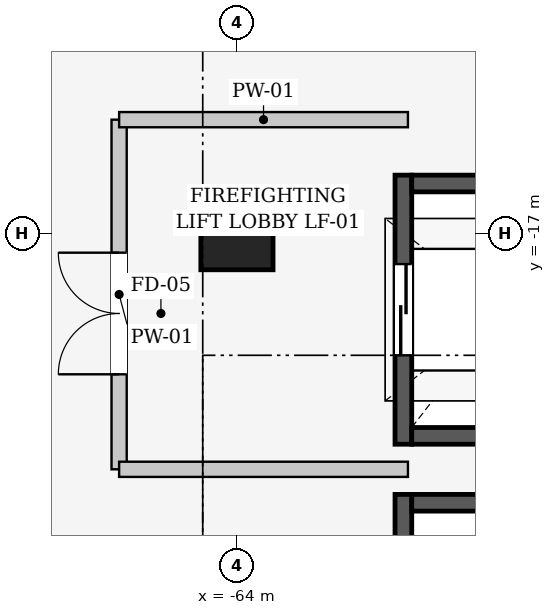
"""IFC4 building model, lengths in metres.
Left out: names, types, materials, properties, quantities, classifications, styles, units other than length and angle.
Written with IfcOpenShell. Run it as: python <this file> out.ifc"""

import sys

from ifc_helpers import new_model, si_unit, direction, frame, frame_2d, origin, origin_2d, place, context, subcontext, project, spatial, rectangle, extrude, element, fill, save


model = new_model("IFC4")
c1 = context("Model", 3, precision=1e-05, world=origin(), true_north=direction((0.0, 1.0)))
c2 = subcontext(c1, "Body", "Model", "MODEL_VIEW")
j1 = project(units=[si_unit("LENGTHUNIT", "METRE"), si_unit("PLANEANGLEUNIT", "RADIAN")], contexts=[c1])
p1 = place(None, origin())
s1 = spatial("IfcSite", under=j1, at=p1, CompositionType="ELEMENT")
p2 = place(p1, origin())
s2 = spatial("IfcBuilding", under=s1, at=p2, CompositionType="ELEMENT")
p3 = place(p2, frame((0.0, 0.0, 6.0)))
s3 = spatial("IfcBuildingStorey", under=s2, at=p3, CompositionType="ELEMENT", Elevation=6.0)
p4 = place(p3, frame((-64.0, -17.0, 0.0), z_axis=(0.0, 0.0, 1.0), x_axis=(1.0, 0.0, 0.0)))
e1 = element("IfcColumn", 1, at=p4, inside=s3, PredefinedType="COLUMN", context=c2, shape_type="SweptSolid", body=[
    extrude(rectangle(XDim=0.95, YDim=0.95, at=origin_2d()), origin(), (0.0, 0.0, 1.0), 5.4),
])
p5 = place(p3, frame((-61.81, -19.77, 0.0), z_axis=(0.0, 0.0, 1.0), x_axis=(0.0, 1.0, 0.0)))
e2 = element("IfcWall", 2, at=p5, inside=s3, PredefinedType="SHEAR", context=c2, shape_type="SweptSolid", body=[
    extrude(rectangle(XDim=3.54, YDim=0.22, at=frame_2d((1.77, 0.0))), origin(), (0.0, 0.0, 1.0), 5.4),
])
p6 = place(p5, frame((1.17, 0.0, 0.0)))
e3 = element("IfcOpeningElement", 3, at=p6, cuts=e2, PredefinedType="OPENING", context=c2, shape_type="SweptSolid", body=[
    extrude(rectangle(XDim=1.2, YDim=2.2, at=frame_2d((0.6, 1.1))), frame((0.0, 0.12, 0.0), z_axis=(0.0, -1.0, 0.0), x_axis=(1.0, 0.0, 0.0)), (0.0, 0.0, 1.0), 0.24),
])
for number, where, z_axis, x_axis in (
    (4, (-61.7, -16.34, 0.0), (0.0, 0.0, 1.0), (1.0, 0.0, 0.0)),
    (5, (-59.3, -19.66, 0.0), (0.0, 0.0, 1.0), (-1.0, 0.0, 0.0)),
):
    element("IfcWall", number, at=place(p3, frame(where, z_axis=z_axis, x_axis=x_axis)), inside=s3, PredefinedType="SHEAR", context=c2, shape_type="SweptSolid", body=[
        extrude(rectangle(XDim=2.4, YDim=0.22, at=frame_2d((1.2, 0.0))), origin(), (0.0, 0.0, 1.0), 5.4),
    ])
p7 = place(p3, frame((-61.81, -23.97, 0.0), z_axis=(0.0, 0.0, 1.0), x_axis=(0.0, 1.0, 0.0)))
e6 = element("IfcWall", 6, at=p7, inside=s3, PredefinedType="SHEAR", context=c2, shape_type="SweptSolid", body=[
    extrude(rectangle(XDim=3.54, YDim=0.22, at=frame_2d((1.77, 0.0))), origin(), (0.0, 0.0, 1.0), 5.4),
])
p8 = place(p7, frame((1.22, 0.0, 0.0)))
e7 = element("IfcOpeningElement", 7, at=p8, cuts=e6, PredefinedType="OPENING", context=c2, shape_type="SweptSolid", body=[
    extrude(rectangle(XDim=1.1, YDim=2.2, at=frame_2d((0.55, 1.1))), frame((0.0, 0.12, 0.0), z_axis=(0.0, -1.0, 0.0), x_axis=(1.0, 0.0, 0.0)), (0.0, 0.0, 1.0), 0.24),
])
p9 = place(p3, frame((-61.7, -20.54, 0.0), z_axis=(0.0, 0.0, 1.0), x_axis=(1.0, 0.0, 0.0)))
e8 = element("IfcWall", 8, at=p9, inside=s3, PredefinedType="SHEAR", context=c2, shape_type="SweptSolid", body=[
    extrude(rectangle(XDim=2.4, YDim=0.22, at=frame_2d((1.2, 0.0))), origin(), (0.0, 0.0, 1.0), 5.4),
])
p10 = place(p3, frame((-65.55, -20.1, 0.0), z_axis=(0.0, 0.0, 1.0), x_axis=(0.0, 1.0, 0.0)))
e9 = element("IfcWall", 9, at=p10, inside=s3, PredefinedType="PARTITIONING", context=c2, shape_type="SweptSolid", body=[
    extrude(rectangle(XDim=4.6, YDim=0.2, at=frame_2d((2.3, 0.0))), origin(), (0.0, 0.0, 1.0), 4.145),
])
p11 = place(p10, frame((1.25, 0.0, 0.0)))
e10 = element("IfcOpeningElement", 10, at=p11, cuts=e9, PredefinedType="OPENING", context=c2, shape_type="SweptSolid", body=[
    extrude(rectangle(XDim=1.6, YDim=2.2, at=frame_2d((0.8, 1.1))), frame((0.0, 0.11, 0.0), z_axis=(0.0, -1.0, 0.0), x_axis=(1.0, 0.0, 0.0)), (0.0, 0.0, 1.0), 0.22),
])
for number, where, z_axis, x_axis in (
    (11, (-65.55, -15.5, 0.0), (0.0, 0.0, 1.0), (1.0, 0.0, 0.0)),
    (12, (-61.75, -20.1, 0.0), (0.0, 0.0, 1.0), (-1.0, 0.0, 0.0)),
):
    element("IfcWall", number, at=place(p3, frame(where, z_axis=z_axis, x_axis=x_axis)), inside=s3, PredefinedType="PARTITIONING", context=c2, shape_type="SweptSolid", body=[
        extrude(rectangle(XDim=3.8, YDim=0.2, at=frame_2d((1.9, 0.0))), origin(), (0.0, 0.0, 1.0), 4.445),
    ])
p12 = place(p6, origin())
e13 = element("IfcDoor", 13, at=p12, inside=s3, OperationType="SLIDING_TO_LEFT", PredefinedType="DOOR", context=c2, shape_type="SweptSolid", body=[
    extrude(rectangle(XDim=1.2, YDim=2.2, at=frame_2d((0.6, 1.1))), frame((0.0, 0.025, 0.0), z_axis=(0.0, -1.0, 0.0), x_axis=(1.0, 0.0, 0.0)), (0.0, 0.0, 1.0), 0.05),
])
fill(e3, e13)
p13 = place(p11, origin())
e14 = element("IfcDoor", 14, at=p13, inside=s3, OperationType="DOUBLE_DOOR_SINGLE_SWING", PredefinedType="DOOR", context=c2, shape_type="SweptSolid", body=[
    extrude(rectangle(XDim=1.6, YDim=2.2, at=frame_2d((0.8, 1.1))), frame((0.0, 0.025, 0.0), z_axis=(0.0, -1.0, 0.0), x_axis=(1.0, 0.0, 0.0)), (0.0, 0.0, 1.0), 0.05),
])
fill(e10, e14)
save(model, sys.argv[1])
